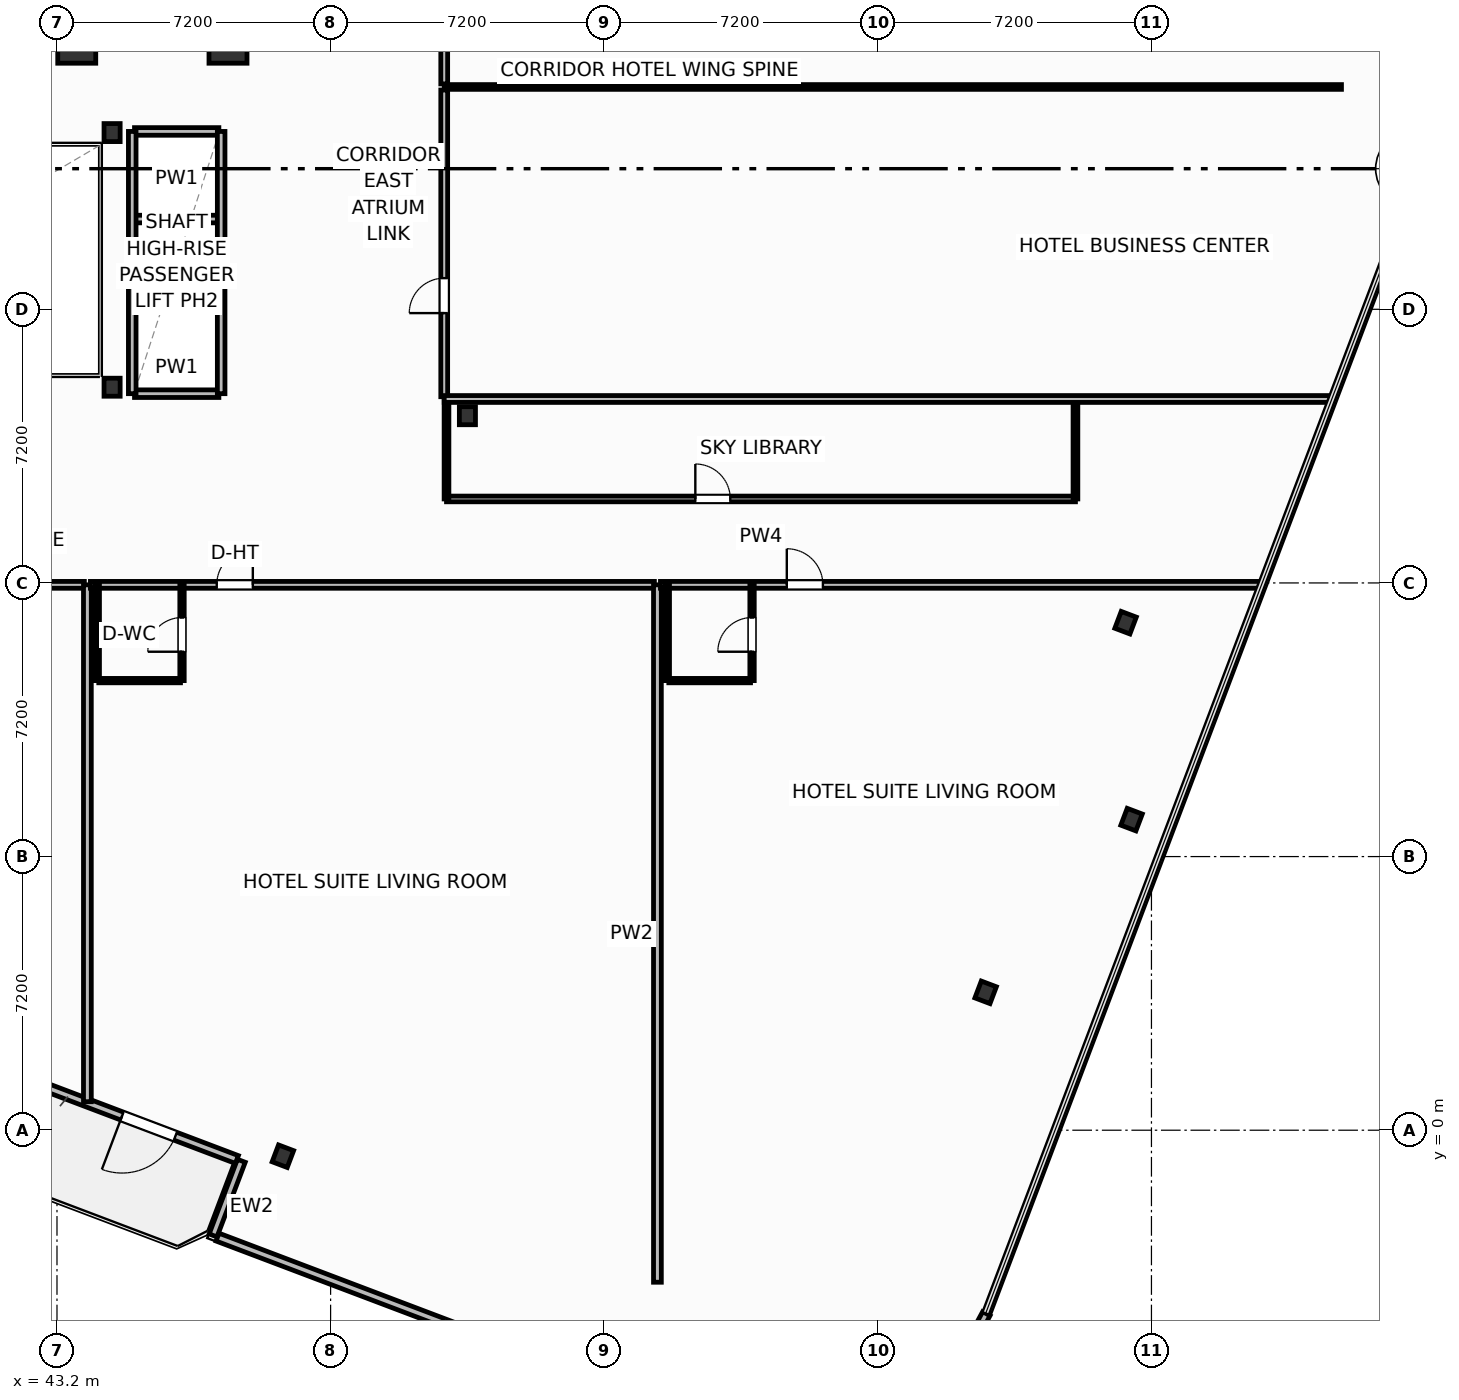
"""IFC4 building model, lengths in metres.
Left out: names, types, materials, properties, quantities, classifications, styles, units other than length and angle.
Written with IfcOpenShell. Run it as: python <this file> out.ifc"""

import sys

from ifc_helpers import new_model, si_unit, direction, frame, frame_2d, origin, origin_2d, place, context, subcontext, project, spatial, rectangle, i_section, extrude, element, fill, save


model = new_model("IFC4")
c1 = context("Model", 3, precision=1e-05, world=origin(), true_north=direction((0.0, 1.0)))
c2 = subcontext(c1, "Body", "Model", "MODEL_VIEW")
j1 = project(units=[si_unit("LENGTHUNIT", "METRE"), si_unit("PLANEANGLEUNIT", "RADIAN")], contexts=[c1])
p1 = place(None, origin())
s1 = spatial("IfcSite", under=j1, at=p1, CompositionType="ELEMENT")
p2 = place(p1, origin())
s2 = spatial("IfcBuilding", under=s1, at=p2, CompositionType="ELEMENT")
p3 = place(p2, frame((0.0, 0.0, 87.3)))
s3 = spatial("IfcBuildingStorey", under=s2, at=p3, CompositionType="ELEMENT", Elevation=87.3)
for number, where, z_axis, x_axis in (
    (1, (43.72, 28.75, 0.0), (0.0, 0.0, 1.0), (1.0, 0.0, 0.0)),
    (2, (47.7, 28.75, 0.0), (0.0, 0.0, 1.0), (1.0, 0.0, 0.0)),
):
    element("IfcColumn", number, at=place(p3, frame(where, z_axis=z_axis, x_axis=x_axis)), inside=s3, PredefinedType="COLUMN", context=c2, shape_type="SweptSolid", body=[
        extrude(rectangle(XDim=1.0, YDim=1.35, at=origin_2d()), origin(), (0.0, 0.0, 1.0), 3.7),
    ])
for number, where, z_axis, x_axis in (
    (3, (44.65, 19.55, 0.0), (0.0, 0.0, 1.0), (1.0, 0.0, 0.0)),
    (4, (44.65, 26.25, 0.0), (0.0, 0.0, 1.0), (1.0, 0.0, 0.0)),
    (5, (54.0, 18.8, 0.0), (0.0, 0.0, 1.0), (1.0, 0.0, 0.0)),
    (6, (49.144, -0.684, 0.0), (0.0, 0.0, 1.0), (0.935, -0.354, 0.0)),
    (7, (67.637, 3.628, 0.0), (0.0, 0.0, 1.0), (0.935, -0.354, 0.0)),
    (8, (71.477, 8.173, 0.0), (0.0, 0.0, 1.0), (0.935, -0.354, 0.0)),
    (9, (71.319, 13.354, 0.0), (0.0, 0.0, 1.0), (0.935, -0.354, 0.0)),
):
    element("IfcColumn", number, at=place(p3, frame(where, z_axis=z_axis, x_axis=x_axis)), inside=s3, PredefinedType="COLUMN", context=c2, shape_type="SweptSolid", body=[
        extrude(i_section(OverallWidth=0.424, OverallDepth=0.474, WebThickness=0.048, FlangeThickness=0.077, FilletRadius=0.025, at=origin_2d()), origin(), (0.0, 0.0, 1.0), 3.7),
    ])
p4 = place(p3, frame((47.935, -0.771, 0.0), z_axis=(0.0, 0.0, 1.0), x_axis=(-0.935227640088, 0.354046976001, 0.0)))
e10 = element("IfcWall", 10, at=p4, inside=s3, PredefinedType="SOLIDWALL", context=c2, shape_type="SweptSolid", body=[
    extrude(rectangle(XDim=6.0, YDim=0.22, at=frame_2d((3.0, 0.0))), origin(), (0.0, 0.0, 1.0), 2.73),
])
p5 = place(p4, frame((1.732, 0.0, 0.0)))
e11 = element("IfcOpeningElement", 11, at=p5, cuts=e10, PredefinedType="OPENING", context=c2, shape_type="SweptSolid", body=[
    extrude(rectangle(XDim=1.5, YDim=2.25, at=frame_2d((0.75, 1.125))), frame((0.0, 0.12, 0.0), z_axis=(0.0, -1.0, 0.0), x_axis=(1.0, 0.0, 0.0)), (0.0, 0.0, 1.0), 0.24),
])
p6 = place(p3, frame((48.051, -0.805, 0.0), z_axis=(0.0, 0.0, 1.0), x_axis=(-0.353988291547, -0.935249854022, 0.0)))
e12 = element("IfcWall", 12, at=p6, inside=s3, PredefinedType="SOLIDWALL", context=c2, shape_type="SweptSolid", body=[
    extrude(rectangle(XDim=2.1, YDim=0.22, at=frame_2d((1.05, 0.0))), origin(), (0.0, 0.0, 1.0), 2.73),
])
p7 = place(p3, frame((47.424, -2.813, 0.0), z_axis=(0.0, 0.0, 1.0), x_axis=(0.935225962032, -0.354051408614, 0.0)))
e13 = element("IfcWall", 13, at=p7, inside=s3, PredefinedType="SOLIDWALL", context=c2, shape_type="SweptSolid", body=[
    extrude(rectangle(XDim=14.347, YDim=0.22, at=frame_2d((7.173, 0.0))), origin(), (0.0, 0.0, 1.0), 2.73),
])
p8 = place(p7, frame((6.348, 0.0, 0.8)))
e14 = element("IfcOpeningElement", 14, at=p8, cuts=e13, PredefinedType="OPENING", context=c2, shape_type="SweptSolid", body=[
    extrude(rectangle(XDim=1.65, YDim=1.65, at=frame_2d((0.825, 0.825))), frame((0.0, 0.12, 0.0), z_axis=(0.0, -1.0, 0.0), x_axis=(1.0, 0.0, 0.0)), (0.0, 0.0, 1.0), 0.24),
])
p9 = place(p3, frame((67.015, -6.019, 0.0), z_axis=(0.0, 0.0, 1.0), x_axis=(0.473077364598, 0.881020889142, 0.0)))
e15 = element("IfcWall", 15, at=p9, inside=s3, PredefinedType="SOLIDWALL", context=c2, shape_type="SweptSolid", body=[
    extrude(rectangle(XDim=1.353, YDim=0.22, at=frame_2d((0.677, 0.0))), origin(), (0.0, 0.0, 1.0), 2.73),
])
p10 = place(p3, frame((53.45, 16.61, 0.0), z_axis=(0.0, 0.0, 1.0), x_axis=(1.0, 0.0, 0.0)))
e16 = element("IfcWall", 16, at=p10, inside=s3, PredefinedType="PARTITIONING", context=c2, shape_type="SweptSolid", body=[
    extrude(rectangle(XDim=16.55, YDim=0.15, at=frame_2d((8.275, 0.0))), origin(), (0.0, 0.0, 1.0), 2.58),
])
p11 = place(p10, frame((6.548, 0.0, 0.0)))
e17 = element("IfcOpeningElement", 17, at=p11, cuts=e16, PredefinedType="OPENING", context=c2, shape_type="SweptSolid", body=[
    extrude(rectangle(XDim=0.92, YDim=2.05, at=frame_2d((0.46, 1.025))), frame((0.0, 0.085, 0.0), z_axis=(0.0, -1.0, 0.0), x_axis=(1.0, 0.0, 0.0)), (0.0, 0.0, 1.0), 0.17),
])
p12 = place(p3, frame((53.45, 16.61, 0.0), z_axis=(0.0, 0.0, 1.0), x_axis=(0.0, 1.0, 0.0)))
e18 = element("IfcWall", 18, at=p12, inside=s3, PredefinedType="PARTITIONING", context=c2, shape_type="SweptSolid", body=[
    extrude(rectangle(XDim=2.63, YDim=0.125, at=frame_2d((1.315, 0.0))), origin(), (0.0, 0.0, 1.0), 2.58),
])
p13 = place(p3, frame((70.0, 16.61, 0.0), z_axis=(0.0, 0.0, 1.0), x_axis=(0.0, 1.0, 0.0)))
e19 = element("IfcWall", 19, at=p13, inside=s3, PredefinedType="PARTITIONING", context=c2, shape_type="SweptSolid", body=[
    extrude(rectangle(XDim=2.63, YDim=0.125, at=frame_2d((1.315, 0.0))), origin(), (0.0, 0.0, 1.0), 2.824),
])
p14 = place(p3, frame((26.08, 14.35, 0.0), z_axis=(0.0, 0.0, 1.0), x_axis=(1.0, 0.0, 0.0)))
e20 = element("IfcWall", 20, at=p14, inside=s3, PredefinedType="PARTITIONING", context=c2, shape_type="SweptSolid", body=[
    extrude(rectangle(XDim=17.84, YDim=0.18, at=frame_2d((8.92, 0.0))), origin(), (0.0, 0.0, 1.0), 3.45),
])
p15 = place(p14, frame((8.445, 0.0, 0.0)))
e21 = element("IfcOpeningElement", 21, at=p15, cuts=e20, PredefinedType="OPENING", context=c2, shape_type="SweptSolid", body=[
    extrude(rectangle(XDim=0.95, YDim=2.05, at=frame_2d((0.475, 1.025))), frame((0.0, 0.1, 0.0), z_axis=(0.0, -1.0, 0.0), x_axis=(1.0, 0.0, 0.0)), (0.0, 0.0, 1.0), 0.2),
])
p16 = place(p3, frame((44.0, 0.75, 0.0), z_axis=(0.0, 0.0, 1.0), x_axis=(0.0, 1.0, 0.0)))
e22 = element("IfcWall", 22, at=p16, inside=s3, PredefinedType="PARTITIONING", context=c2, shape_type="SweptSolid", body=[
    extrude(rectangle(XDim=13.6, YDim=0.205, at=frame_2d((6.8, 0.0))), origin(), (0.0, 0.0, 1.0), 3.45),
])
p17 = place(p3, frame((44.08, 14.35, 0.0), z_axis=(0.0, 0.0, 1.0), x_axis=(1.0, 0.0, 0.0)))
e23 = element("IfcWall", 23, at=p17, inside=s3, PredefinedType="PARTITIONING", context=c2, shape_type="SweptSolid", body=[
    extrude(rectangle(XDim=14.84, YDim=0.18, at=frame_2d((7.42, 0.0))), origin(), (0.0, 0.0, 1.0), 3.45),
])
p18 = place(p17, frame((3.323, 0.0, 0.0)))
e24 = element("IfcOpeningElement", 24, at=p18, cuts=e23, PredefinedType="OPENING", context=c2, shape_type="SweptSolid", body=[
    extrude(rectangle(XDim=0.95, YDim=2.15, at=frame_2d((0.475, 1.075))), frame((0.0, 0.1, 0.0), z_axis=(0.0, -1.0, 0.0), x_axis=(1.0, 0.0, 0.0)), (0.0, 0.0, 1.0), 0.2),
])
p19 = place(p3, frame((44.3, 11.83, 0.0), z_axis=(0.0, 0.0, 1.0), x_axis=(1.0, 0.0, 0.0)))
e25 = element("IfcWall", 25, at=p19, inside=s3, PredefinedType="PARTITIONING", context=c2, shape_type="SweptSolid", body=[
    extrude(rectangle(XDim=2.15, YDim=0.115, at=frame_2d((1.075, 0.0))), origin(), (0.0, 0.0, 1.0), 3.45),
])
p20 = place(p3, frame((46.49, 11.83, 0.0), z_axis=(0.0, 0.0, 1.0), x_axis=(0.0, 1.0, 0.0)))
e26 = element("IfcWall", 26, at=p20, inside=s3, PredefinedType="PARTITIONING", context=c2, shape_type="SweptSolid", body=[
    extrude(rectangle(XDim=2.52, YDim=0.115, at=frame_2d((1.26, 0.0))), origin(), (0.0, 0.0, 1.0), 3.45),
])
p21 = place(p20, frame((0.76, 0.0, 0.0)))
e27 = element("IfcOpeningElement", 27, at=p21, cuts=e26, PredefinedType="OPENING", context=c2, shape_type="SweptSolid", body=[
    extrude(rectangle(XDim=0.9, YDim=2.05, at=frame_2d((0.45, 1.025))), frame((0.0, 0.067, 0.0), z_axis=(0.0, -1.0, 0.0), x_axis=(1.0, 0.0, 0.0)), (0.0, 0.0, 1.0), 0.135),
])
p22 = place(p3, frame((44.26, 11.83, 0.0), z_axis=(0.0, 0.0, 1.0), x_axis=(0.0, 1.0, 0.0)))
e28 = element("IfcWall", 28, at=p22, inside=s3, PredefinedType="PARTITIONING", context=c2, shape_type="SweptSolid", body=[
    extrude(rectangle(XDim=2.52, YDim=0.115, at=frame_2d((1.26, 0.0))), origin(), (0.0, 0.0, 1.0), 3.45),
])
p23 = place(p3, frame((59.0, -4.0, 0.0), z_axis=(0.0, 0.0, 1.0), x_axis=(0.0, 1.0, 0.0)))
e29 = element("IfcWall", 29, at=p23, inside=s3, PredefinedType="PARTITIONING", context=c2, shape_type="SweptSolid", body=[
    extrude(rectangle(XDim=18.35, YDim=0.205, at=frame_2d((9.175, 0.0))), origin(), (0.0, 0.0, 1.0), 3.45),
])
p24 = place(p3, frame((59.08, 14.35, 0.0), z_axis=(0.0, 0.0, 1.0), x_axis=(1.0, 0.0, 0.0)))
e30 = element("IfcWall", 30, at=p24, inside=s3, PredefinedType="PARTITIONING", context=c2, shape_type="SweptSolid", body=[
    extrude(rectangle(XDim=15.775, YDim=0.18, at=frame_2d((7.888, 0.0))), origin(), (0.0, 0.0, 1.0), 2.58),
])
p25 = place(p24, frame((3.324, 0.0, 0.0)))
e31 = element("IfcOpeningElement", 31, at=p25, cuts=e30, PredefinedType="OPENING", context=c2, shape_type="SweptSolid", body=[
    extrude(rectangle(XDim=0.95, YDim=2.15, at=frame_2d((0.475, 1.075))), frame((0.0, 0.1, 0.0), z_axis=(0.0, -1.0, 0.0), x_axis=(1.0, 0.0, 0.0)), (0.0, 0.0, 1.0), 0.2),
])
p26 = place(p3, frame((59.3, 11.83, 0.0), z_axis=(0.0, 0.0, 1.0), x_axis=(1.0, 0.0, 0.0)))
e32 = element("IfcWall", 32, at=p26, inside=s3, PredefinedType="PARTITIONING", context=c2, shape_type="SweptSolid", body=[
    extrude(rectangle(XDim=2.15, YDim=0.115, at=frame_2d((1.075, 0.0))), origin(), (0.0, 0.0, 1.0), 3.45),
])
p27 = place(p3, frame((61.49, 11.83, 0.0), z_axis=(0.0, 0.0, 1.0), x_axis=(0.0, 1.0, 0.0)))
e33 = element("IfcWall", 33, at=p27, inside=s3, PredefinedType="PARTITIONING", context=c2, shape_type="SweptSolid", body=[
    extrude(rectangle(XDim=2.52, YDim=0.115, at=frame_2d((1.26, 0.0))), origin(), (0.0, 0.0, 1.0), 3.45),
])
p28 = place(p27, frame((0.76, 0.0, 0.0)))
e34 = element("IfcOpeningElement", 34, at=p28, cuts=e33, PredefinedType="OPENING", context=c2, shape_type="SweptSolid", body=[
    extrude(rectangle(XDim=0.9, YDim=2.05, at=frame_2d((0.45, 1.025))), frame((0.0, 0.067, 0.0), z_axis=(0.0, -1.0, 0.0), x_axis=(1.0, 0.0, 0.0)), (0.0, 0.0, 1.0), 0.135),
])
p29 = place(p3, frame((59.26, 11.83, 0.0), z_axis=(0.0, 0.0, 1.0), x_axis=(0.0, 1.0, 0.0)))
e35 = element("IfcWall", 35, at=p29, inside=s3, PredefinedType="PARTITIONING", context=c2, shape_type="SweptSolid", body=[
    extrude(rectangle(XDim=2.52, YDim=0.115, at=frame_2d((1.26, 0.0))), origin(), (0.0, 0.0, 1.0), 3.45),
])
p30 = place(p3, frame((53.39, 19.3, 0.0), z_axis=(0.0, 0.0, 1.0), x_axis=(0.0, 1.0, 0.0)))
e36 = element("IfcWall", 36, at=p30, inside=s3, PredefinedType="PARTITIONING", context=c2, shape_type="SweptSolid", body=[
    extrude(rectangle(XDim=8.07, YDim=0.18, at=frame_2d((4.035, 0.0))), origin(), (0.0, 0.0, 1.0), 3.45),
])
p31 = place(p30, frame((2.2, 0.0, 0.0)))
e37 = element("IfcOpeningElement", 37, at=p31, cuts=e36, PredefinedType="OPENING", context=c2, shape_type="SweptSolid", body=[
    extrude(rectangle(XDim=0.92, YDim=2.05, at=frame_2d((0.46, 1.025))), frame((0.0, 0.1, 0.0), z_axis=(0.0, -1.0, 0.0), x_axis=(1.0, 0.0, 0.0)), (0.0, 0.0, 1.0), 0.2),
])
p32 = place(p3, frame((53.39, 27.53, 0.0), z_axis=(0.0, 0.0, 1.0), x_axis=(0.0, 1.0, 0.0)))
e38 = element("IfcWall", 38, at=p32, inside=s3, PredefinedType="PARTITIONING", context=c2, shape_type="SweptSolid", body=[
    extrude(rectangle(XDim=11.67, YDim=0.18, at=frame_2d((5.835, 0.0))), origin(), (0.0, 0.0, 1.0), 3.45),
])
p33 = place(p32, frame((5.8, 0.0, 0.0)))
e39 = element("IfcOpeningElement", 39, at=p33, cuts=e38, PredefinedType="OPENING", context=c2, shape_type="SweptSolid", body=[
    extrude(rectangle(XDim=0.92, YDim=2.05, at=frame_2d((0.46, 1.025))), frame((0.0, 0.1, 0.0), z_axis=(0.0, -1.0, 0.0), x_axis=(1.0, 0.0, 0.0)), (0.0, 0.0, 1.0), 0.2),
])
p34 = place(p3, frame((53.39, 27.45, 0.0), z_axis=(0.0, 0.0, 1.0), x_axis=(1.0, 0.0, 0.0)))
e40 = element("IfcWall", 40, at=p34, inside=s3, PredefinedType="PARTITIONING", context=c2, shape_type="SweptSolid", body=[
    extrude(rectangle(XDim=23.61, YDim=0.125, at=frame_2d((11.805, 0.0))), origin(), (0.0, 0.0, 1.0), 3.45),
])
p35 = place(p3, frame((53.39, 19.24, 0.0), z_axis=(0.0, 0.0, 1.0), x_axis=(1.0, 0.0, 0.0)))
e41 = element("IfcWall", 41, at=p35, inside=s3, PredefinedType="PARTITIONING", context=c2, shape_type="SweptSolid", body=[
    extrude(rectangle(XDim=23.317, YDim=0.18, at=frame_2d((11.658, 0.0))), origin(), (0.0, 0.0, 1.0), 3.45),
])
for number, where, z_axis, x_axis in (
    (42, (45.24, 21.675, 0.0), (0.0, 0.0, 1.0), (1.0, 0.0, 0.0)),
    (43, (45.24, 23.975, 0.0), (0.0, 0.0, 1.0), (1.0, 0.0, 0.0)),
):
    element("IfcWall", number, at=place(p3, frame(where, z_axis=z_axis, x_axis=x_axis)), inside=s3, PredefinedType="PARTITIONING", context=c2, shape_type="SweptSolid", body=[
        extrude(rectangle(XDim=2.22, YDim=0.2, at=frame_2d((1.11, 0.0))), origin(), (0.0, 0.0, 1.0), 3.45),
    ])
p36 = place(p3, frame((45.24, 19.38, 0.0), z_axis=(0.0, 0.0, 1.0), x_axis=(1.0, 0.0, 0.0)))
e44 = element("IfcWall", 44, at=p36, inside=s3, PredefinedType="PARTITIONING", context=c2, shape_type="SweptSolid", body=[
    extrude(rectangle(XDim=2.22, YDim=0.2, at=frame_2d((1.11, 0.0))), origin(), (0.0, 0.0, 1.0), 2.662),
])
p37 = place(p3, frame((45.24, 26.28, 0.0), z_axis=(0.0, 0.0, 1.0), x_axis=(1.0, 0.0, 0.0)))
e45 = element("IfcWall", 45, at=p37, inside=s3, PredefinedType="PARTITIONING", context=c2, shape_type="SweptSolid", body=[
    extrude(rectangle(XDim=2.22, YDim=0.2, at=frame_2d((1.11, 0.0))), origin(), (0.0, 0.0, 1.0), 3.45),
])
for number, where, z_axis, x_axis in (
    (46, (45.18, 19.38, 0.0), (0.0, 0.0, 1.0), (0.0, 1.0, 0.0)),
    (47, (47.52, 19.38, 0.0), (0.0, 0.0, 1.0), (0.0, 1.0, 0.0)),
):
    element("IfcWall", number, at=place(p3, frame(where, z_axis=z_axis, x_axis=x_axis)), inside=s3, PredefinedType="PARTITIONING", context=c2, shape_type="SweptSolid", body=[
        extrude(rectangle(XDim=6.9, YDim=0.2, at=frame_2d((3.45, 0.0))), origin(), (0.0, 0.0, 1.0), 3.45),
    ])
p38 = place(p5, origin())
e48 = element("IfcDoor", 48, at=p38, inside=s3, OperationType="SINGLE_SWING_RIGHT", PredefinedType="DOOR", context=c2, shape_type="SweptSolid", body=[
    extrude(rectangle(XDim=1.5, YDim=2.25, at=frame_2d((0.75, 1.125))), frame((0.0, 0.025, 0.0), z_axis=(0.0, -1.0, 0.0), x_axis=(1.0, 0.0, 0.0)), (0.0, 0.0, 1.0), 0.05),
])
fill(e11, e48)
p39 = place(p11, origin())
e49 = element("IfcDoor", 49, at=p39, inside=s3, OperationType="SINGLE_SWING_LEFT", PredefinedType="DOOR", context=c2, shape_type="SweptSolid", body=[
    extrude(rectangle(XDim=0.92, YDim=2.05, at=frame_2d((0.46, 1.025))), frame((0.0, 0.025, 0.0), z_axis=(0.0, -1.0, 0.0), x_axis=(1.0, 0.0, 0.0)), (0.0, 0.0, 1.0), 0.05),
])
fill(e17, e49)
p40 = place(p18, origin())
e50 = element("IfcDoor", 50, at=p40, inside=s3, OperationType="SINGLE_SWING_RIGHT", PredefinedType="DOOR", context=c2, shape_type="SweptSolid", body=[
    extrude(rectangle(XDim=0.95, YDim=2.15, at=frame_2d((0.475, 1.075))), frame((0.0, 0.025, 0.0), z_axis=(0.0, -1.0, 0.0), x_axis=(1.0, 0.0, 0.0)), (0.0, 0.0, 1.0), 0.05),
])
fill(e24, e50)
p41 = place(p21, origin())
e51 = element("IfcDoor", 51, at=p41, inside=s3, OperationType="SINGLE_SWING_LEFT", PredefinedType="DOOR", context=c2, shape_type="SweptSolid", body=[
    extrude(rectangle(XDim=0.9, YDim=2.05, at=frame_2d((0.45, 1.025))), frame((0.0, 0.025, 0.0), z_axis=(0.0, -1.0, 0.0), x_axis=(1.0, 0.0, 0.0)), (0.0, 0.0, 1.0), 0.05),
])
fill(e27, e51)
p42 = place(p25, origin())
e52 = element("IfcDoor", 52, at=p42, inside=s3, OperationType="SINGLE_SWING_LEFT", PredefinedType="DOOR", context=c2, shape_type="SweptSolid", body=[
    extrude(rectangle(XDim=0.95, YDim=2.15, at=frame_2d((0.475, 1.075))), frame((0.0, 0.025, 0.0), z_axis=(0.0, -1.0, 0.0), x_axis=(1.0, 0.0, 0.0)), (0.0, 0.0, 1.0), 0.05),
])
fill(e31, e52)
p43 = place(p28, origin())
e53 = element("IfcDoor", 53, at=p43, inside=s3, OperationType="SINGLE_SWING_LEFT", PredefinedType="DOOR", context=c2, shape_type="SweptSolid", body=[
    extrude(rectangle(XDim=0.9, YDim=2.05, at=frame_2d((0.45, 1.025))), frame((0.0, 0.025, 0.0), z_axis=(0.0, -1.0, 0.0), x_axis=(1.0, 0.0, 0.0)), (0.0, 0.0, 1.0), 0.05),
])
fill(e34, e53)
p44 = place(p31, origin())
e54 = element("IfcDoor", 54, at=p44, inside=s3, OperationType="SINGLE_SWING_LEFT", PredefinedType="DOOR", context=c2, shape_type="SweptSolid", body=[
    extrude(rectangle(XDim=0.92, YDim=2.05, at=frame_2d((0.46, 1.025))), frame((0.0, 0.025, 0.0), z_axis=(0.0, -1.0, 0.0), x_axis=(1.0, 0.0, 0.0)), (0.0, 0.0, 1.0), 0.05),
])
fill(e37, e54)
save(model, sys.argv[1])
